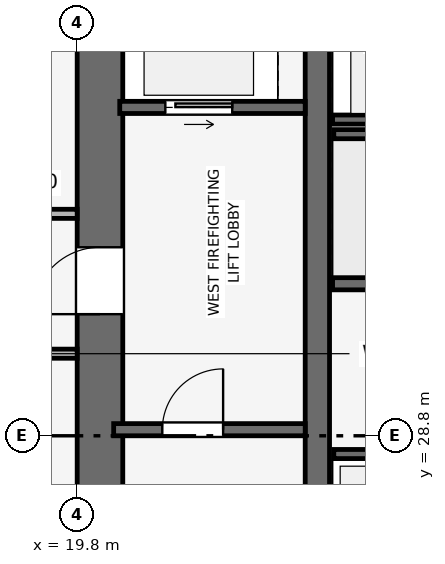
"""IFC4 building model, lengths in metres.
Left out: names, types, materials, properties, quantities, classifications, styles, units other than length and angle.
Written with IfcOpenShell. Run it as: python <this file> out.ifc"""

import sys

from ifc_helpers import new_model, si_unit, direction, frame, frame_2d, origin, place, context, subcontext, project, spatial, rectangle, extrude, element, fill, save


model = new_model("IFC4")
c1 = context("Model", 3, precision=1e-05, world=origin(), true_north=direction((0.0, 1.0)))
c2 = subcontext(c1, "Body", "Model", "MODEL_VIEW")
j1 = project(units=[si_unit("LENGTHUNIT", "METRE"), si_unit("PLANEANGLEUNIT", "RADIAN")], contexts=[c1])
p1 = place(None, origin())
s1 = spatial("IfcSite", under=j1, at=p1, CompositionType="ELEMENT")
p2 = place(p1, origin())
s2 = spatial("IfcBuilding", under=s1, at=p2, CompositionType="ELEMENT")
p3 = place(p2, frame((0.0, 0.0, 226.2)))
s3 = spatial("IfcBuildingStorey", under=s2, at=p3, CompositionType="ELEMENT", Elevation=226.2)
p4 = place(p3, frame((20.175, 20.55, 0.0), z_axis=(0.0, 0.0, 1.0), x_axis=(0.0, 1.0, 0.0)))
e1 = element("IfcWall", 1, at=p4, inside=s3, PredefinedType="SHEAR", context=c2, shape_type="SweptSolid", body=[
    extrude(rectangle(XDim=16.5, YDim=0.75, at=frame_2d((8.25, 0.0))), origin(), (0.0, 0.0, 1.0), 3.75),
])
p5 = place(p4, frame((10.25, 0.0, 0.0)))
e2 = element("IfcOpeningElement", 2, at=p5, cuts=e1, PredefinedType="OPENING", context=c2, shape_type="SweptSolid", body=[
    extrude(rectangle(XDim=1.1, YDim=2.15, at=frame_2d((0.55, 1.075))), frame((0.0, 0.385, 0.0), z_axis=(0.0, -1.0, 0.0), x_axis=(1.0, 0.0, 0.0)), (0.0, 0.0, 1.0), 0.77),
])
p6 = place(p3, frame((23.75, 20.55, 0.0), z_axis=(0.0, 0.0, 1.0), x_axis=(0.0, 1.0, 0.0)))
e3 = element("IfcWall", 3, at=p6, inside=s3, PredefinedType="SHEAR", context=c2, shape_type="SweptSolid", body=[
    extrude(rectangle(XDim=16.5, YDim=0.4, at=frame_2d((8.25, 0.0))), origin(), (0.0, 0.0, 1.0), 3.75),
])
p7 = place(p3, frame((20.4, 28.9, 0.0), z_axis=(0.0, 0.0, 1.0), x_axis=(1.0, 0.0, 0.0)))
e4 = element("IfcWall", 4, at=p7, inside=s3, PredefinedType="SHEAR", context=c2, shape_type="SweptSolid", body=[
    extrude(rectangle(XDim=3.15, YDim=0.2, at=frame_2d((1.575, 0.0))), origin(), (0.0, 0.0, 1.0), 3.5),
])
p8 = place(p7, frame((0.8, 0.0, 0.0)))
e5 = element("IfcOpeningElement", 5, at=p8, cuts=e4, PredefinedType="OPENING", context=c2, shape_type="SweptSolid", body=[
    extrude(rectangle(XDim=1.0, YDim=2.1, at=frame_2d((0.5, 1.05))), frame((0.0, 0.11, 0.0), z_axis=(0.0, -1.0, 0.0), x_axis=(1.0, 0.0, 0.0)), (0.0, 0.0, 1.0), 0.22),
])
p9 = place(p3, frame((20.5, 34.2, 0.0), z_axis=(0.0, 0.0, 1.0), x_axis=(1.0, 0.0, 0.0)))
e6 = element("IfcWall", 6, at=p9, inside=s3, PredefinedType="SHEAR", context=c2, shape_type="SweptSolid", body=[
    extrude(rectangle(XDim=3.05, YDim=0.2, at=frame_2d((1.525, 0.0))), origin(), (0.0, 0.0, 1.0), 3.5),
])
p10 = place(p9, frame((0.75, 0.0, 0.0)))
e7 = element("IfcOpeningElement", 7, at=p10, cuts=e6, PredefinedType="OPENING", context=c2, shape_type="SweptSolid", body=[
    extrude(rectangle(XDim=1.1, YDim=2.15, at=frame_2d((0.55, 1.075))), frame((0.0, 0.11, 0.0), z_axis=(0.0, -1.0, 0.0), x_axis=(1.0, 0.0, 0.0)), (0.0, 0.0, 1.0), 0.22),
])
p11 = place(p3, frame((24.0, 34.0, 0.0), z_axis=(0.0, 0.0, 1.0), x_axis=(1.0, 0.0, 0.0)))
e8 = element("IfcWall", 8, at=p11, inside=s3, PredefinedType="SHEAR", context=c2, shape_type="SweptSolid", body=[
    extrude(rectangle(XDim=2.48, YDim=0.15, at=frame_2d((1.24, 0.0))), origin(), (0.0, 0.0, 1.0), 3.5),
])
p12 = place(p3, frame((24.0, 31.3, 0.0), z_axis=(0.0, 0.0, 1.0), x_axis=(1.0, 0.0, 0.0)))
e9 = element("IfcWall", 9, at=p12, inside=s3, PredefinedType="SHEAR", context=c2, shape_type="SweptSolid", body=[
    extrude(rectangle(XDim=2.0, YDim=0.2, at=frame_2d((1.0, 0.0))), origin(), (0.0, 0.0, 1.0), 3.5),
])
for number, where, z_axis, x_axis in (
    (10, (24.02, 28.5, 0.0), (0.0, 0.0, 1.0), (1.0, 0.0, 0.0)),
    (11, (24.02, 33.76, 0.0), (0.0, 0.0, 1.0), (1.0, 0.0, 0.0)),
):
    element("IfcWall", number, at=place(p3, frame(where, z_axis=z_axis, x_axis=x_axis)), inside=s3, PredefinedType="SHEAR", context=c2, shape_type="SweptSolid", body=[
        extrude(rectangle(XDim=4.08, YDim=0.15, at=frame_2d((2.04, 0.0))), origin(), (0.0, 0.0, 1.0), 3.5),
    ])
for number, where, z_axis, x_axis in (
    (12, (15.4, 30.15, 0.0), (0.0, 0.0, 1.0), (1.0, 0.0, 0.0)),
    (13, (15.4, 32.45, 0.0), (0.0, 0.0, 1.0), (1.0, 0.0, 0.0)),
):
    element("IfcWall", number, at=place(p3, frame(where, z_axis=z_axis, x_axis=x_axis)), inside=s3, PredefinedType="PARTITIONING", context=c2, shape_type="SweptSolid", body=[
        extrude(rectangle(XDim=4.4, YDim=0.15, at=frame_2d((2.2, 0.0))), origin(), (0.0, 0.0, 1.0), 3.5),
    ])
p13 = place(p8, origin())
e14 = element("IfcDoor", 14, at=p13, inside=s3, OperationType="SINGLE_SWING_RIGHT", PredefinedType="DOOR", context=c2, shape_type="SweptSolid", body=[
    extrude(rectangle(XDim=1.0, YDim=2.1, at=frame_2d((0.5, 1.05))), frame((0.0, 0.025, 0.0), z_axis=(0.0, -1.0, 0.0), x_axis=(1.0, 0.0, 0.0)), (0.0, 0.0, 1.0), 0.05),
])
fill(e5, e14)
p14 = place(p10, origin())
e15 = element("IfcDoor", 15, at=p14, inside=s3, OperationType="SLIDING_TO_RIGHT", PredefinedType="DOOR", context=c2, shape_type="SweptSolid", body=[
    extrude(rectangle(XDim=1.1, YDim=2.15, at=frame_2d((0.55, 1.075))), frame((0.0, 0.025, 0.0), z_axis=(0.0, -1.0, 0.0), x_axis=(1.0, 0.0, 0.0)), (0.0, 0.0, 1.0), 0.05),
])
fill(e7, e15)
p15 = place(p5, origin())
e16 = element("IfcDoor", 16, at=p15, inside=s3, OperationType="SINGLE_SWING_LEFT", PredefinedType="DOOR", context=c2, shape_type="SweptSolid", body=[
    extrude(rectangle(XDim=1.1, YDim=2.15, at=frame_2d((0.55, 1.075))), frame((0.0, 0.025, 0.0), z_axis=(0.0, -1.0, 0.0), x_axis=(1.0, 0.0, 0.0)), (0.0, 0.0, 1.0), 0.05),
])
fill(e2, e16)
save(model, sys.argv[1])
